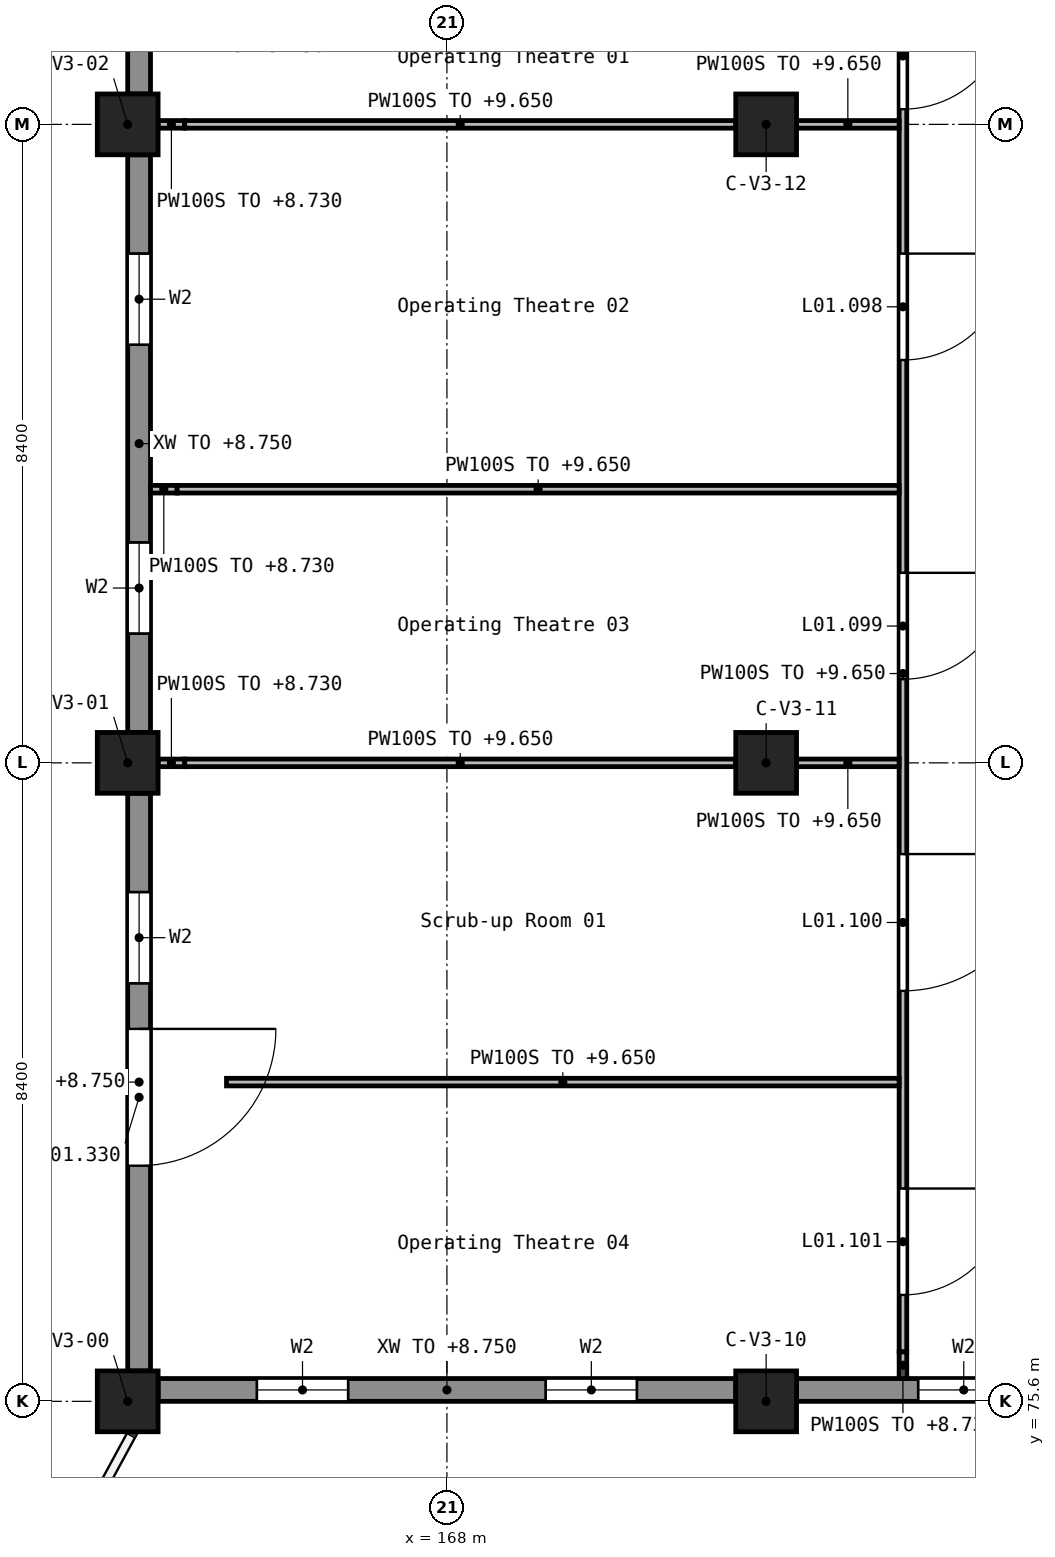
"""IFC4 building model, lengths in metres.
Left out: names, types, materials, properties, quantities, classifications, styles, units other than length and angle.
Written with IfcOpenShell. Run it as: python <this file> out.ifc"""

import sys

from ifc_helpers import new_model, si_unit, direction, frame, frame_2d, origin, origin_2d, place, context, subcontext, project, spatial, rectangle, extrude, element, fill, save


model = new_model("IFC4")
c1 = context("Model", 3, precision=1e-05, world=origin(), true_north=direction((0.0, 1.0)))
c2 = subcontext(c1, "Body", "Model", "MODEL_VIEW")
j1 = project(units=[si_unit("LENGTHUNIT", "METRE"), si_unit("PLANEANGLEUNIT", "RADIAN")], contexts=[c1])
p1 = place(None, origin())
s1 = spatial("IfcSite", under=j1, at=p1, CompositionType="ELEMENT")
p2 = place(p1, origin())
s2 = spatial("IfcBuilding", under=s1, at=p2, CompositionType="ELEMENT")
p3 = place(p2, frame((0.0, 0.0, 5.4)))
s3 = spatial("IfcBuildingStorey", under=s2, at=p3, CompositionType="ELEMENT", Elevation=5.4)
for number, where, z_axis, x_axis in (
    (1, (163.8, 75.6, 0.0), (0.0, 0.0, 1.0), (1.0, 0.0, 0.0)),
    (2, (163.8, 84.0, 0.0), (0.0, 0.0, 1.0), (1.0, 0.0, 0.0)),
    (3, (163.8, 92.4, 0.0), (0.0, 0.0, 1.0), (1.0, 0.0, 0.0)),
    (4, (172.2, 75.6, 0.0), (0.0, 0.0, 1.0), (1.0, 0.0, 0.0)),
    (5, (172.2, 84.0, 0.0), (0.0, 0.0, 1.0), (1.0, 0.0, 0.0)),
    (6, (172.2, 92.4, 0.0), (0.0, 0.0, 1.0), (1.0, 0.0, 0.0)),
):
    element("IfcColumn", number, at=place(p3, frame(where, z_axis=z_axis, x_axis=x_axis)), inside=s3, PredefinedType="COLUMN", context=c2, shape_type="SweptSolid", body=[
        extrude(rectangle(XDim=0.8, YDim=0.8, at=origin_2d()), origin(), (0.0, 0.0, 1.0), 4.5),
    ])
p4 = place(p3, frame((163.95, 94.025, 0.0), z_axis=(0.0, 0.0, 1.0), x_axis=(0.0, -1.0, 0.0)))
e7 = element("IfcWall", 7, at=p4, inside=s3, PredefinedType="STANDARD", context=c2, shape_type="SweptSolid", body=[
    extrude(rectangle(XDim=1.225, YDim=0.3, at=frame_2d((0.612, 0.0))), origin(), (0.0, 0.0, 1.0), 3.35),
])
p5 = place(p3, frame((163.95, 92.0, 0.0), z_axis=(0.0, 0.0, 1.0), x_axis=(0.0, -1.0, 0.0)))
e8 = element("IfcWall", 8, at=p5, inside=s3, PredefinedType="STANDARD", context=c2, shape_type="SweptSolid", body=[
    extrude(rectangle(XDim=7.6, YDim=0.3, at=frame_2d((3.8, 0.0))), origin(), (0.0, 0.0, 1.0), 3.35),
])
p6 = place(p5, frame((1.3, 0.0, 1.2)))
e9 = element("IfcOpeningElement", 9, at=p6, cuts=e8, PredefinedType="OPENING", context=c2, shape_type="SweptSolid", body=[
    extrude(rectangle(XDim=1.2, YDim=1.2, at=frame_2d((0.6, 0.6))), frame((0.0, 0.16, 0.0), z_axis=(0.0, -1.0, 0.0), x_axis=(1.0, 0.0, 0.0)), (0.0, 0.0, 1.0), 0.32),
])
p7 = place(p5, frame((5.1, 0.0, 1.2)))
e10 = element("IfcOpeningElement", 10, at=p7, cuts=e8, PredefinedType="OPENING", context=c2, shape_type="SweptSolid", body=[
    extrude(rectangle(XDim=1.2, YDim=1.2, at=frame_2d((0.6, 0.6))), frame((0.0, 0.16, 0.0), z_axis=(0.0, -1.0, 0.0), x_axis=(1.0, 0.0, 0.0)), (0.0, 0.0, 1.0), 0.32),
])
p8 = place(p3, frame((163.95, 83.6, 0.0), z_axis=(0.0, 0.0, 1.0), x_axis=(0.0, -1.0, 0.0)))
e11 = element("IfcWall", 11, at=p8, inside=s3, PredefinedType="STANDARD", context=c2, shape_type="SweptSolid", body=[
    extrude(rectangle(XDim=7.6, YDim=0.3, at=frame_2d((3.8, 0.0))), origin(), (0.0, 0.0, 1.0), 3.35),
])
p9 = place(p8, frame((3.1, 0.0, 0.0)))
e12 = element("IfcOpeningElement", 12, at=p9, cuts=e11, PredefinedType="OPENING", context=c2, shape_type="SweptSolid", body=[
    extrude(rectangle(XDim=1.8, YDim=2.4, at=frame_2d((0.9, 1.2))), frame((0.0, 0.16, 0.0), z_axis=(0.0, -1.0, 0.0), x_axis=(1.0, 0.0, 0.0)), (0.0, 0.0, 1.0), 0.32),
])
p10 = place(p8, frame((1.3, 0.0, 1.2)))
e13 = element("IfcOpeningElement", 13, at=p10, cuts=e11, PredefinedType="OPENING", context=c2, shape_type="SweptSolid", body=[
    extrude(rectangle(XDim=1.2, YDim=1.2, at=frame_2d((0.6, 0.6))), frame((0.0, 0.16, 0.0), z_axis=(0.0, -1.0, 0.0), x_axis=(1.0, 0.0, 0.0)), (0.0, 0.0, 1.0), 0.32),
])
p11 = place(p3, frame((164.2, 75.75, 0.0), z_axis=(0.0, 0.0, 1.0), x_axis=(1.0, 0.0, 0.0)))
e14 = element("IfcWall", 14, at=p11, inside=s3, PredefinedType="STANDARD", context=c2, shape_type="SweptSolid", body=[
    extrude(rectangle(XDim=7.6, YDim=0.3, at=frame_2d((3.8, 0.0))), origin(), (0.0, 0.0, 1.0), 3.35),
])
p12 = place(p11, frame((1.3, 0.0, 1.2)))
e15 = element("IfcOpeningElement", 15, at=p12, cuts=e14, PredefinedType="OPENING", context=c2, shape_type="SweptSolid", body=[
    extrude(rectangle(XDim=1.2, YDim=1.2, at=frame_2d((0.6, 0.6))), frame((0.0, 0.16, 0.0), z_axis=(0.0, -1.0, 0.0), x_axis=(1.0, 0.0, 0.0)), (0.0, 0.0, 1.0), 0.32),
])
p13 = place(p11, frame((5.1, 0.0, 1.2)))
e16 = element("IfcOpeningElement", 16, at=p13, cuts=e14, PredefinedType="OPENING", context=c2, shape_type="SweptSolid", body=[
    extrude(rectangle(XDim=1.2, YDim=1.2, at=frame_2d((0.6, 0.6))), frame((0.0, 0.16, 0.0), z_axis=(0.0, -1.0, 0.0), x_axis=(1.0, 0.0, 0.0)), (0.0, 0.0, 1.0), 0.32),
])
p14 = place(p3, frame((172.6, 75.75, 0.0), z_axis=(0.0, 0.0, 1.0), x_axis=(1.0, 0.0, 0.0)))
e17 = element("IfcWall", 17, at=p14, inside=s3, PredefinedType="STANDARD", context=c2, shape_type="SweptSolid", body=[
    extrude(rectangle(XDim=7.6, YDim=0.3, at=frame_2d((3.8, 0.0))), origin(), (0.0, 0.0, 1.0), 3.35),
])
p15 = place(p14, frame((1.6, 0.0, 1.2)))
e18 = element("IfcOpeningElement", 18, at=p15, cuts=e17, PredefinedType="OPENING", context=c2, shape_type="SweptSolid", body=[
    extrude(rectangle(XDim=1.2, YDim=1.2, at=frame_2d((0.6, 0.6))), frame((0.0, 0.16, 0.0), z_axis=(0.0, -1.0, 0.0), x_axis=(1.0, 0.0, 0.0)), (0.0, 0.0, 1.0), 0.32),
])
p16 = place(p14, frame((5.1, 0.0, 1.2)))
e19 = element("IfcOpeningElement", 19, at=p16, cuts=e17, PredefinedType="OPENING", context=c2, shape_type="SweptSolid", body=[
    extrude(rectangle(XDim=1.2, YDim=1.2, at=frame_2d((0.6, 0.6))), frame((0.0, 0.16, 0.0), z_axis=(0.0, -1.0, 0.0), x_axis=(1.0, 0.0, 0.0)), (0.0, 0.0, 1.0), 0.32),
])
p17 = place(p3, frame((174.0, 94.1, 0.0), z_axis=(0.0, 0.0, 1.0), x_axis=(0.0, -1.0, 0.0)))
e20 = element("IfcWall", 20, at=p17, inside=s3, PredefinedType="PARTITIONING", context=c2, shape_type="SweptSolid", body=[
    extrude(rectangle(XDim=17.85, YDim=0.1, at=frame_2d((8.925, 0.0))), origin(), (0.0, 0.0, 1.0), 4.25),
])
p18 = place(p17, frame((0.1, 0.0, 0.0)))
e21 = element("IfcOpeningElement", 21, at=p18, cuts=e20, PredefinedType="OPENING", context=c2, shape_type="SweptSolid", body=[
    extrude(rectangle(XDim=1.4, YDim=2.1, at=frame_2d((0.7, 1.05))), frame((0.0, 0.06, 0.0), z_axis=(0.0, -1.0, 0.0), x_axis=(1.0, 0.0, 0.0)), (0.0, 0.0, 1.0), 0.12),
])
p19 = place(p17, frame((3.4, 0.0, 0.0)))
e22 = element("IfcOpeningElement", 22, at=p19, cuts=e20, PredefinedType="OPENING", context=c2, shape_type="SweptSolid", body=[
    extrude(rectangle(XDim=1.4, YDim=2.1, at=frame_2d((0.7, 1.05))), frame((0.0, 0.06, 0.0), z_axis=(0.0, -1.0, 0.0), x_axis=(1.0, 0.0, 0.0)), (0.0, 0.0, 1.0), 0.12),
])
p20 = place(p17, frame((7.6, 0.0, 0.0)))
e23 = element("IfcOpeningElement", 23, at=p20, cuts=e20, PredefinedType="OPENING", context=c2, shape_type="SweptSolid", body=[
    extrude(rectangle(XDim=1.4, YDim=2.1, at=frame_2d((0.7, 1.05))), frame((0.0, 0.06, 0.0), z_axis=(0.0, -1.0, 0.0), x_axis=(1.0, 0.0, 0.0)), (0.0, 0.0, 1.0), 0.12),
])
p21 = place(p17, frame((11.3, 0.0, 0.0)))
e24 = element("IfcOpeningElement", 24, at=p21, cuts=e20, PredefinedType="OPENING", context=c2, shape_type="SweptSolid", body=[
    extrude(rectangle(XDim=1.8, YDim=2.1, at=frame_2d((0.9, 1.05))), frame((0.0, 0.06, 0.0), z_axis=(0.0, -1.0, 0.0), x_axis=(1.0, 0.0, 0.0)), (0.0, 0.0, 1.0), 0.12),
])
p22 = place(p17, frame((15.7, 0.0, 0.0)))
e25 = element("IfcOpeningElement", 25, at=p22, cuts=e20, PredefinedType="OPENING", context=c2, shape_type="SweptSolid", body=[
    extrude(rectangle(XDim=1.4, YDim=2.1, at=frame_2d((0.7, 1.05))), frame((0.0, 0.06, 0.0), z_axis=(0.0, -1.0, 0.0), x_axis=(1.0, 0.0, 0.0)), (0.0, 0.0, 1.0), 0.12),
])
p23 = place(p3, frame((174.0, 76.25, 0.0), z_axis=(0.0, 0.0, 1.0), x_axis=(0.0, -1.0, 0.0)))
e26 = element("IfcWall", 26, at=p23, inside=s3, PredefinedType="PARTITIONING", context=c2, shape_type="SweptSolid", body=[
    extrude(rectangle(XDim=0.35, YDim=0.1, at=frame_2d((0.175, 0.0))), origin(), (0.0, 0.0, 1.0), 3.33),
])
p24 = place(p3, frame((165.1, 79.8, 0.0), z_axis=(0.0, 0.0, 1.0), x_axis=(1.0, 0.0, 0.0)))
e27 = element("IfcWall", 27, at=p24, inside=s3, PredefinedType="PARTITIONING", context=c2, shape_type="SweptSolid", body=[
    extrude(rectangle(XDim=8.85, YDim=0.1, at=frame_2d((4.425, 0.0))), origin(), (0.0, 0.0, 1.0), 4.25),
])
p25 = place(p3, frame((164.2, 84.0, 0.0), z_axis=(0.0, 0.0, 1.0), x_axis=(1.0, 0.0, 0.0)))
e28 = element("IfcWall", 28, at=p25, inside=s3, PredefinedType="PARTITIONING", context=c2, shape_type="SweptSolid", body=[
    extrude(rectangle(XDim=0.35, YDim=0.1, at=frame_2d((0.175, 0.0))), origin(), (0.0, 0.0, 1.0), 3.33),
])
p26 = place(p3, frame((164.55, 84.0, 0.0), z_axis=(0.0, 0.0, 1.0), x_axis=(1.0, 0.0, 0.0)))
e29 = element("IfcWall", 29, at=p26, inside=s3, PredefinedType="PARTITIONING", context=c2, shape_type="SweptSolid", body=[
    extrude(rectangle(XDim=7.25, YDim=0.1, at=frame_2d((3.625, 0.0))), origin(), (0.0, 0.0, 1.0), 4.25),
])
p27 = place(p3, frame((172.6, 84.0, 0.0), z_axis=(0.0, 0.0, 1.0), x_axis=(1.0, 0.0, 0.0)))
e30 = element("IfcWall", 30, at=p27, inside=s3, PredefinedType="PARTITIONING", context=c2, shape_type="SweptSolid", body=[
    extrude(rectangle(XDim=1.35, YDim=0.1, at=frame_2d((0.675, 0.0))), origin(), (0.0, 0.0, 1.0), 4.25),
])
p28 = place(p3, frame((164.1, 87.6, 0.0), z_axis=(0.0, 0.0, 1.0), x_axis=(1.0, 0.0, 0.0)))
e31 = element("IfcWall", 31, at=p28, inside=s3, PredefinedType="PARTITIONING", context=c2, shape_type="SweptSolid", body=[
    extrude(rectangle(XDim=0.35, YDim=0.1, at=frame_2d((0.175, 0.0))), origin(), (0.0, 0.0, 1.0), 3.33),
])
p29 = place(p3, frame((164.45, 87.6, 0.0), z_axis=(0.0, 0.0, 1.0), x_axis=(1.0, 0.0, 0.0)))
e32 = element("IfcWall", 32, at=p29, inside=s3, PredefinedType="PARTITIONING", context=c2, shape_type="SweptSolid", body=[
    extrude(rectangle(XDim=9.5, YDim=0.1, at=frame_2d((4.75, 0.0))), origin(), (0.0, 0.0, 1.0), 4.25),
])
p30 = place(p3, frame((164.2, 92.4, 0.0), z_axis=(0.0, 0.0, 1.0), x_axis=(1.0, 0.0, 0.0)))
e33 = element("IfcWall", 33, at=p30, inside=s3, PredefinedType="PARTITIONING", context=c2, shape_type="SweptSolid", body=[
    extrude(rectangle(XDim=0.35, YDim=0.1, at=frame_2d((0.175, 0.0))), origin(), (0.0, 0.0, 1.0), 3.33),
])
p31 = place(p3, frame((164.55, 92.4, 0.0), z_axis=(0.0, 0.0, 1.0), x_axis=(1.0, 0.0, 0.0)))
e34 = element("IfcWall", 34, at=p31, inside=s3, PredefinedType="PARTITIONING", context=c2, shape_type="SweptSolid", body=[
    extrude(rectangle(XDim=7.25, YDim=0.1, at=frame_2d((3.625, 0.0))), origin(), (0.0, 0.0, 1.0), 4.25),
])
p32 = place(p3, frame((172.6, 92.4, 0.0), z_axis=(0.0, 0.0, 1.0), x_axis=(1.0, 0.0, 0.0)))
e35 = element("IfcWall", 35, at=p32, inside=s3, PredefinedType="PARTITIONING", context=c2, shape_type="SweptSolid", body=[
    extrude(rectangle(XDim=1.35, YDim=0.1, at=frame_2d((0.675, 0.0))), origin(), (0.0, 0.0, 1.0), 4.25),
])
p33 = place(p9, origin())
e36 = element("IfcDoor", 36, at=p33, inside=s3, OperationType="SINGLE_SWING_LEFT", PredefinedType="DOOR", context=c2, shape_type="SweptSolid", body=[
    extrude(rectangle(XDim=1.8, YDim=2.4, at=frame_2d((0.9, 1.2))), frame((0.0, 0.025, 0.0), z_axis=(0.0, -1.0, 0.0), x_axis=(1.0, 0.0, 0.0)), (0.0, 0.0, 1.0), 0.05),
])
fill(e12, e36)
p34 = place(p6, origin())
e37 = element("IfcWindow", 37, at=p34, inside=s3, PartitioningType="SINGLE_PANEL", PredefinedType="WINDOW", context=c2, shape_type="SweptSolid", body=[
    extrude(rectangle(XDim=1.2, YDim=1.2, at=frame_2d((0.6, 0.6))), frame((0.0, 0.03, 0.0), z_axis=(0.0, -1.0, 0.0), x_axis=(1.0, 0.0, 0.0)), (0.0, 0.0, 1.0), 0.06),
])
fill(e9, e37)
p35 = place(p7, origin())
e38 = element("IfcWindow", 38, at=p35, inside=s3, PartitioningType="SINGLE_PANEL", PredefinedType="WINDOW", context=c2, shape_type="SweptSolid", body=[
    extrude(rectangle(XDim=1.2, YDim=1.2, at=frame_2d((0.6, 0.6))), frame((0.0, 0.03, 0.0), z_axis=(0.0, -1.0, 0.0), x_axis=(1.0, 0.0, 0.0)), (0.0, 0.0, 1.0), 0.06),
])
fill(e10, e38)
p36 = place(p10, origin())
e39 = element("IfcWindow", 39, at=p36, inside=s3, PartitioningType="SINGLE_PANEL", PredefinedType="WINDOW", context=c2, shape_type="SweptSolid", body=[
    extrude(rectangle(XDim=1.2, YDim=1.2, at=frame_2d((0.6, 0.6))), frame((0.0, 0.03, 0.0), z_axis=(0.0, -1.0, 0.0), x_axis=(1.0, 0.0, 0.0)), (0.0, 0.0, 1.0), 0.06),
])
fill(e13, e39)
p37 = place(p12, origin())
e40 = element("IfcWindow", 40, at=p37, inside=s3, PartitioningType="SINGLE_PANEL", PredefinedType="WINDOW", context=c2, shape_type="SweptSolid", body=[
    extrude(rectangle(XDim=1.2, YDim=1.2, at=frame_2d((0.6, 0.6))), frame((0.0, 0.03, 0.0), z_axis=(0.0, -1.0, 0.0), x_axis=(1.0, 0.0, 0.0)), (0.0, 0.0, 1.0), 0.06),
])
fill(e15, e40)
p38 = place(p13, origin())
e41 = element("IfcWindow", 41, at=p38, inside=s3, PartitioningType="SINGLE_PANEL", PredefinedType="WINDOW", context=c2, shape_type="SweptSolid", body=[
    extrude(rectangle(XDim=1.2, YDim=1.2, at=frame_2d((0.6, 0.6))), frame((0.0, 0.03, 0.0), z_axis=(0.0, -1.0, 0.0), x_axis=(1.0, 0.0, 0.0)), (0.0, 0.0, 1.0), 0.06),
])
fill(e16, e41)
p39 = place(p15, origin())
e42 = element("IfcWindow", 42, at=p39, inside=s3, PartitioningType="SINGLE_PANEL", PredefinedType="WINDOW", context=c2, shape_type="SweptSolid", body=[
    extrude(rectangle(XDim=1.2, YDim=1.2, at=frame_2d((0.6, 0.6))), frame((0.0, 0.03, 0.0), z_axis=(0.0, -1.0, 0.0), x_axis=(1.0, 0.0, 0.0)), (0.0, 0.0, 1.0), 0.06),
])
fill(e18, e42)
p40 = place(p18, frame((1.4, 0.0, 0.0), z_axis=(0.0, 0.0, 1.0), x_axis=(-1.0, 0.0, 0.0)))
e43 = element("IfcDoor", 43, at=p40, inside=s3, OperationType="DOUBLE_DOOR_SINGLE_SWING", PredefinedType="DOOR", context=c2, shape_type="SweptSolid", body=[
    extrude(rectangle(XDim=1.4, YDim=2.1, at=frame_2d((0.7, 1.05))), frame((0.0, 0.025, 0.0), z_axis=(0.0, -1.0, 0.0), x_axis=(1.0, 0.0, 0.0)), (0.0, 0.0, 1.0), 0.05),
])
fill(e21, e43)
p41 = place(p19, frame((1.4, 0.0, 0.0), z_axis=(0.0, 0.0, 1.0), x_axis=(-1.0, 0.0, 0.0)))
e44 = element("IfcDoor", 44, at=p41, inside=s3, OperationType="DOUBLE_DOOR_SINGLE_SWING", PredefinedType="DOOR", context=c2, shape_type="SweptSolid", body=[
    extrude(rectangle(XDim=1.4, YDim=2.1, at=frame_2d((0.7, 1.05))), frame((0.0, 0.025, 0.0), z_axis=(0.0, -1.0, 0.0), x_axis=(1.0, 0.0, 0.0)), (0.0, 0.0, 1.0), 0.05),
])
fill(e22, e44)
p42 = place(p20, frame((1.4, 0.0, 0.0), z_axis=(0.0, 0.0, 1.0), x_axis=(-1.0, 0.0, 0.0)))
e45 = element("IfcDoor", 45, at=p42, inside=s3, OperationType="DOUBLE_DOOR_SINGLE_SWING", PredefinedType="DOOR", context=c2, shape_type="SweptSolid", body=[
    extrude(rectangle(XDim=1.4, YDim=2.1, at=frame_2d((0.7, 1.05))), frame((0.0, 0.025, 0.0), z_axis=(0.0, -1.0, 0.0), x_axis=(1.0, 0.0, 0.0)), (0.0, 0.0, 1.0), 0.05),
])
fill(e23, e45)
p43 = place(p21, frame((1.8, 0.0, 0.0), z_axis=(0.0, 0.0, 1.0), x_axis=(-1.0, 0.0, 0.0)))
e46 = element("IfcDoor", 46, at=p43, inside=s3, OperationType="DOUBLE_DOOR_SINGLE_SWING", PredefinedType="DOOR", context=c2, shape_type="SweptSolid", body=[
    extrude(rectangle(XDim=1.8, YDim=2.1, at=frame_2d((0.9, 1.05))), frame((0.0, 0.025, 0.0), z_axis=(0.0, -1.0, 0.0), x_axis=(1.0, 0.0, 0.0)), (0.0, 0.0, 1.0), 0.05),
])
fill(e24, e46)
p44 = place(p22, frame((1.4, 0.0, 0.0), z_axis=(0.0, 0.0, 1.0), x_axis=(-1.0, 0.0, 0.0)))
e47 = element("IfcDoor", 47, at=p44, inside=s3, OperationType="DOUBLE_DOOR_SINGLE_SWING", PredefinedType="DOOR", context=c2, shape_type="SweptSolid", body=[
    extrude(rectangle(XDim=1.4, YDim=2.1, at=frame_2d((0.7, 1.05))), frame((0.0, 0.025, 0.0), z_axis=(0.0, -1.0, 0.0), x_axis=(1.0, 0.0, 0.0)), (0.0, 0.0, 1.0), 0.05),
])
fill(e25, e47)
save(model, sys.argv[1])
